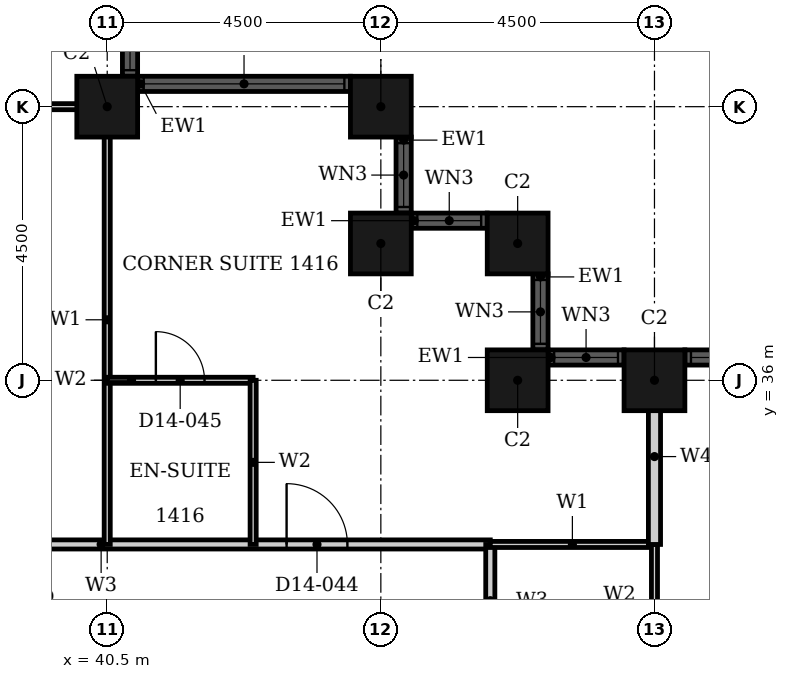
"""IFC4 building model, lengths in metres.
Left out: names, types, materials, properties, quantities, classifications, styles, units other than length and angle.
Written with IfcOpenShell. Run it as: python <this file> out.ifc"""

import sys

from ifc_helpers import new_model, si_unit, direction, frame, frame_2d, origin, origin_2d, place, context, subcontext, project, spatial, rectangle, hollow_rectangle, extrude, element, fill, save


model = new_model("IFC4")
c1 = context("Model", 3, precision=1e-05, world=origin(), true_north=direction((0.0, 1.0)))
c2 = subcontext(c1, "Body", "Model", "MODEL_VIEW")
j1 = project(units=[si_unit("LENGTHUNIT", "METRE"), si_unit("PLANEANGLEUNIT", "RADIAN")], contexts=[c1])
p1 = place(None, origin())
s1 = spatial("IfcSite", under=j1, at=p1, CompositionType="ELEMENT")
p2 = place(p1, origin())
s2 = spatial("IfcBuilding", under=s1, at=p2, CompositionType="ELEMENT")
p3 = place(p2, frame((0.0, 0.0, 63.6)))
s3 = spatial("IfcBuildingStorey", under=s2, at=p3, CompositionType="ELEMENT", Elevation=63.6)
for number, where, z_axis, x_axis in (
    (1, (49.5, 36.0, 0.0), (0.0, 0.0, 1.0), (1.0, 0.0, 0.0)),
    (2, (47.25, 36.0, 0.0), (0.0, 0.0, 1.0), (1.0, 0.0, 0.0)),
    (3, (47.25, 38.25, 0.0), (0.0, 0.0, 1.0), (1.0, 0.0, 0.0)),
    (4, (45.0, 38.25, 0.0), (0.0, 0.0, 1.0), (1.0, 0.0, 0.0)),
    (5, (45.0, 40.5, 0.0), (0.0, 0.0, 1.0), (1.0, 0.0, 0.0)),
    (6, (40.5, 40.5, 0.0), (0.0, 0.0, 1.0), (1.0, 0.0, 0.0)),
):
    element("IfcColumn", number, at=place(p3, frame(where, z_axis=z_axis, x_axis=x_axis)), inside=s3, PredefinedType="COLUMN", context=c2, shape_type="SweptSolid", body=[
        extrude(hollow_rectangle(XDim=1.0, YDim=1.0, WallThickness=0.032, at=origin_2d()), origin(), (0.0, 0.0, 1.0), 3.6),
    ])
p4 = place(p3, frame((58.0, 36.375, 0.0), z_axis=(0.0, 0.0, 1.0), x_axis=(-1.0, 0.0, 0.0)))
e7 = element("IfcWall", 7, at=p4, inside=s3, PredefinedType="SOLIDWALL", context=c2, shape_type="SweptSolid", body=[
    extrude(rectangle(XDim=8.0, YDim=0.25, at=frame_2d((4.0, 0.0))), origin(), (0.0, 0.0, 1.0), 3.6),
])
p5 = place(p4, frame((0.1, 0.0, 0.9)))
e8 = element("IfcOpeningElement", 8, at=p5, cuts=e7, PredefinedType="OPENING", context=c2, shape_type="SweptSolid", body=[
    extrude(rectangle(XDim=3.3, YDim=2.08, at=frame_2d((1.65, 1.04))), frame((0.0, 0.135, 0.0), z_axis=(0.0, -1.0, 0.0), x_axis=(1.0, 0.0, 0.0)), (0.0, 0.0, 1.0), 0.27),
])
p6 = place(p4, frame((4.6, 0.0, 0.9)))
e9 = element("IfcOpeningElement", 9, at=p6, cuts=e7, PredefinedType="OPENING", context=c2, shape_type="SweptSolid", body=[
    extrude(rectangle(XDim=3.3, YDim=2.08, at=frame_2d((1.65, 1.04))), frame((0.0, 0.135, 0.0), z_axis=(0.0, -1.0, 0.0), x_axis=(1.0, 0.0, 0.0)), (0.0, 0.0, 1.0), 0.27),
])
p7 = place(p3, frame((49.0, 36.375, 0.0), z_axis=(0.0, 0.0, 1.0), x_axis=(-1.0, 0.0, 0.0)))
e10 = element("IfcWall", 10, at=p7, inside=s3, PredefinedType="SOLIDWALL", context=c2, shape_type="SweptSolid", body=[
    extrude(rectangle(XDim=1.25, YDim=0.25, at=frame_2d((0.625, 0.0))), origin(), (0.0, 0.0, 1.0), 3.6),
])
p8 = place(p7, frame((0.1, 0.0, 0.9)))
e11 = element("IfcOpeningElement", 11, at=p8, cuts=e10, PredefinedType="OPENING", context=c2, shape_type="SweptSolid", body=[
    extrude(rectangle(XDim=1.05, YDim=2.08, at=frame_2d((0.525, 1.04))), frame((0.0, 0.135, 0.0), z_axis=(0.0, -1.0, 0.0), x_axis=(1.0, 0.0, 0.0)), (0.0, 0.0, 1.0), 0.27),
])
p9 = place(p3, frame((47.625, 36.5, 0.0), z_axis=(0.0, 0.0, 1.0), x_axis=(0.0, 1.0, 0.0)))
e12 = element("IfcWall", 12, at=p9, inside=s3, PredefinedType="SOLIDWALL", context=c2, shape_type="SweptSolid", body=[
    extrude(rectangle(XDim=1.25, YDim=0.25, at=frame_2d((0.625, 0.0))), origin(), (0.0, 0.0, 1.0), 3.6),
])
p10 = place(p9, frame((0.1, 0.0, 0.9)))
e13 = element("IfcOpeningElement", 13, at=p10, cuts=e12, PredefinedType="OPENING", context=c2, shape_type="SweptSolid", body=[
    extrude(rectangle(XDim=1.05, YDim=2.08, at=frame_2d((0.525, 1.04))), frame((0.0, 0.135, 0.0), z_axis=(0.0, -1.0, 0.0), x_axis=(1.0, 0.0, 0.0)), (0.0, 0.0, 1.0), 0.27),
])
p11 = place(p3, frame((46.75, 38.625, 0.0), z_axis=(0.0, 0.0, 1.0), x_axis=(-1.0, 0.0, 0.0)))
e14 = element("IfcWall", 14, at=p11, inside=s3, PredefinedType="SOLIDWALL", context=c2, shape_type="SweptSolid", body=[
    extrude(rectangle(XDim=1.25, YDim=0.25, at=frame_2d((0.625, 0.0))), origin(), (0.0, 0.0, 1.0), 3.6),
])
p12 = place(p11, frame((0.1, 0.0, 0.9)))
e15 = element("IfcOpeningElement", 15, at=p12, cuts=e14, PredefinedType="OPENING", context=c2, shape_type="SweptSolid", body=[
    extrude(rectangle(XDim=1.05, YDim=2.08, at=frame_2d((0.525, 1.04))), frame((0.0, 0.135, 0.0), z_axis=(0.0, -1.0, 0.0), x_axis=(1.0, 0.0, 0.0)), (0.0, 0.0, 1.0), 0.27),
])
p13 = place(p3, frame((45.375, 38.75, 0.0), z_axis=(0.0, 0.0, 1.0), x_axis=(0.0, 1.0, 0.0)))
e16 = element("IfcWall", 16, at=p13, inside=s3, PredefinedType="SOLIDWALL", context=c2, shape_type="SweptSolid", body=[
    extrude(rectangle(XDim=1.25, YDim=0.25, at=frame_2d((0.625, 0.0))), origin(), (0.0, 0.0, 1.0), 3.6),
])
p14 = place(p13, frame((0.1, 0.0, 0.9)))
e17 = element("IfcOpeningElement", 17, at=p14, cuts=e16, PredefinedType="OPENING", context=c2, shape_type="SweptSolid", body=[
    extrude(rectangle(XDim=1.05, YDim=2.08, at=frame_2d((0.525, 1.04))), frame((0.0, 0.135, 0.0), z_axis=(0.0, -1.0, 0.0), x_axis=(1.0, 0.0, 0.0)), (0.0, 0.0, 1.0), 0.27),
])
p15 = place(p3, frame((44.5, 40.875, 0.0), z_axis=(0.0, 0.0, 1.0), x_axis=(-1.0, 0.0, 0.0)))
e18 = element("IfcWall", 18, at=p15, inside=s3, PredefinedType="SOLIDWALL", context=c2, shape_type="SweptSolid", body=[
    extrude(rectangle(XDim=3.5, YDim=0.25, at=frame_2d((1.75, 0.0))), origin(), (0.0, 0.0, 1.0), 3.6),
])
p16 = place(p15, frame((0.1, 0.0, 0.9)))
e19 = element("IfcOpeningElement", 19, at=p16, cuts=e18, PredefinedType="OPENING", context=c2, shape_type="SweptSolid", body=[
    extrude(rectangle(XDim=3.3, YDim=2.08, at=frame_2d((1.65, 1.04))), frame((0.0, 0.135, 0.0), z_axis=(0.0, -1.0, 0.0), x_axis=(1.0, 0.0, 0.0)), (0.0, 0.0, 1.0), 0.27),
])
p17 = place(p3, frame((40.875, 41.0, 0.0), z_axis=(0.0, 0.0, 1.0), x_axis=(0.0, 1.0, 0.0)))
e20 = element("IfcWall", 20, at=p17, inside=s3, PredefinedType="SOLIDWALL", context=c2, shape_type="SweptSolid", body=[
    extrude(rectangle(XDim=8.0, YDim=0.25, at=frame_2d((4.0, 0.0))), origin(), (0.0, 0.0, 1.0), 3.6),
])
p18 = place(p17, frame((0.1, 0.0, 0.9)))
e21 = element("IfcOpeningElement", 21, at=p18, cuts=e20, PredefinedType="OPENING", context=c2, shape_type="SweptSolid", body=[
    extrude(rectangle(XDim=3.3, YDim=2.08, at=frame_2d((1.65, 1.04))), frame((0.0, 0.135, 0.0), z_axis=(0.0, -1.0, 0.0), x_axis=(1.0, 0.0, 0.0)), (0.0, 0.0, 1.0), 0.27),
])
p19 = place(p17, frame((4.6, 0.0, 0.9)))
e22 = element("IfcOpeningElement", 22, at=p19, cuts=e20, PredefinedType="OPENING", context=c2, shape_type="SweptSolid", body=[
    extrude(rectangle(XDim=3.3, YDim=2.08, at=frame_2d((1.65, 1.04))), frame((0.0, 0.135, 0.0), z_axis=(0.0, -1.0, 0.0), x_axis=(1.0, 0.0, 0.0)), (0.0, 0.0, 1.0), 0.27),
])
p20 = place(p3, frame((33.3, 33.3, 0.0), z_axis=(0.0, 0.0, 1.0), x_axis=(1.0, 0.0, 0.0)))
e23 = element("IfcWall", 23, at=p20, inside=s3, PredefinedType="PARTITIONING", context=c2, shape_type="SweptSolid", body=[
    extrude(rectangle(XDim=13.5, YDim=0.15, at=frame_2d((6.75, 0.0))), origin(), (0.0, 0.0, 1.0), 3.3),
])
p21 = place(p20, frame((10.15, 0.0, 0.0)))
e24 = element("IfcOpeningElement", 24, at=p21, cuts=e23, PredefinedType="OPENING", context=c2, shape_type="SweptSolid", body=[
    extrude(rectangle(XDim=1.0, YDim=2.1, at=frame_2d((0.5, 1.05))), frame((0.0, 0.085, 0.0), z_axis=(0.0, -1.0, 0.0), x_axis=(1.0, 0.0, 0.0)), (0.0, 0.0, 1.0), 0.17),
])
p22 = place(p20, frame((3.15, 0.0, 0.0)))
e25 = element("IfcOpeningElement", 25, at=p22, cuts=e23, PredefinedType="OPENING", context=c2, shape_type="SweptSolid", body=[
    extrude(rectangle(XDim=0.9, YDim=2.1, at=frame_2d((0.45, 1.05))), frame((0.0, 0.085, 0.0), z_axis=(0.0, -1.0, 0.0), x_axis=(1.0, 0.0, 0.0)), (0.0, 0.0, 1.0), 0.17),
])
p23 = place(p3, frame((46.8, 28.8, 0.0), z_axis=(0.0, 0.0, 1.0), x_axis=(0.0, 1.0, 0.0)))
e26 = element("IfcWall", 26, at=p23, inside=s3, PredefinedType="PARTITIONING", context=c2, shape_type="SweptSolid", body=[
    extrude(rectangle(XDim=4.5, YDim=0.15, at=frame_2d((2.25, 0.0))), origin(), (0.0, 0.0, 1.0), 3.3),
])
p24 = place(p23, frame((1.75, 0.0, 0.0)))
e27 = element("IfcOpeningElement", 27, at=p24, cuts=e26, PredefinedType="OPENING", context=c2, shape_type="SweptSolid", body=[
    extrude(rectangle(XDim=0.9, YDim=2.1, at=frame_2d((0.45, 1.05))), frame((0.0, 0.085, 0.0), z_axis=(0.0, -1.0, 0.0), x_axis=(1.0, 0.0, 0.0)), (0.0, 0.0, 1.0), 0.17),
])
p25 = place(p3, frame((46.8, 33.3, 0.0), z_axis=(0.0, 0.0, 1.0), x_axis=(1.0, 0.0, 0.0)))
e28 = element("IfcWall", 28, at=p25, inside=s3, PredefinedType="PARTITIONING", context=c2, shape_type="SweptSolid", body=[
    extrude(rectangle(XDim=2.7, YDim=0.1, at=frame_2d((1.35, 0.0))), origin(), (0.0, 0.0, 1.0), 3.3),
])
p26 = place(p3, frame((33.3, 40.5, 0.0), z_axis=(0.0, 0.0, 1.0), x_axis=(1.0, 0.0, 0.0)))
e29 = element("IfcWall", 29, at=p26, inside=s3, PredefinedType="PARTITIONING", context=c2, shape_type="SweptSolid", body=[
    extrude(rectangle(XDim=7.39, YDim=0.1, at=frame_2d((3.695, 0.0))), origin(), (0.0, 0.0, 1.0), 2.38),
])
p27 = place(p3, frame((40.5, 33.3, 0.0), z_axis=(0.0, 0.0, 1.0), x_axis=(0.0, 1.0, 0.0)))
e30 = element("IfcWall", 30, at=p27, inside=s3, PredefinedType="PARTITIONING", context=c2, shape_type="SweptSolid", body=[
    extrude(rectangle(XDim=7.39, YDim=0.1, at=frame_2d((3.695, 0.0))), origin(), (0.0, 0.0, 1.0), 3.3),
])
p28 = place(p3, frame((49.5, 28.8, 0.0), z_axis=(0.0, 0.0, 1.0), x_axis=(0.0, 1.0, 0.0)))
e31 = element("IfcWall", 31, at=p28, inside=s3, PredefinedType="PARTITIONING", context=c2, shape_type="SweptSolid", body=[
    extrude(rectangle(XDim=4.5, YDim=0.1, at=frame_2d((2.25, 0.0))), origin(), (0.0, 0.0, 1.0), 2.38),
])
p29 = place(p3, frame((49.5, 33.3, 0.0), z_axis=(0.0, 0.0, 1.0), x_axis=(0.0, 1.0, 0.0)))
e32 = element("IfcWall", 32, at=p29, inside=s3, PredefinedType="PARTITIONING", context=c2, shape_type="SweptSolid", body=[
    extrude(rectangle(XDim=2.89, YDim=0.2, at=frame_2d((1.445, 0.0))), origin(), (0.0, 0.0, 1.0), 2.38),
])
p30 = place(p3, frame((40.5, 36.0, 0.0), z_axis=(0.0, 0.0, 1.0), x_axis=(1.0, 0.0, 0.0)))
e33 = element("IfcWall", 33, at=p30, inside=s3, PredefinedType="PARTITIONING", context=c2, shape_type="SweptSolid", body=[
    extrude(rectangle(XDim=2.4, YDim=0.1, at=frame_2d((1.2, 0.0))), origin(), (0.0, 0.0, 1.0), 3.3),
])
p31 = place(p30, frame((0.8, 0.0, 0.0)))
e34 = element("IfcOpeningElement", 34, at=p31, cuts=e33, PredefinedType="OPENING", context=c2, shape_type="SweptSolid", body=[
    extrude(rectangle(XDim=0.8, YDim=2.1, at=frame_2d((0.4, 1.05))), frame((0.0, 0.06, 0.0), z_axis=(0.0, -1.0, 0.0), x_axis=(1.0, 0.0, 0.0)), (0.0, 0.0, 1.0), 0.12),
])
p32 = place(p3, frame((42.9, 33.3, 0.0), z_axis=(0.0, 0.0, 1.0), x_axis=(0.0, 1.0, 0.0)))
e35 = element("IfcWall", 35, at=p32, inside=s3, PredefinedType="PARTITIONING", context=c2, shape_type="SweptSolid", body=[
    extrude(rectangle(XDim=2.7, YDim=0.1, at=frame_2d((1.35, 0.0))), origin(), (0.0, 0.0, 1.0), 3.3),
])
p33 = place(p6, origin())
e36 = element("IfcWindow", 36, at=p33, inside=s3, PartitioningType="SINGLE_PANEL", PredefinedType="WINDOW", context=c2, shape_type="SweptSolid", body=[
    extrude(rectangle(XDim=3.3, YDim=2.08, at=frame_2d((1.65, 1.04))), frame((0.0, 0.03, 0.0), z_axis=(0.0, -1.0, 0.0), x_axis=(1.0, 0.0, 0.0)), (0.0, 0.0, 1.0), 0.06),
])
fill(e9, e36)
p34 = place(p8, origin())
e37 = element("IfcWindow", 37, at=p34, inside=s3, PartitioningType="SINGLE_PANEL", PredefinedType="WINDOW", context=c2, shape_type="SweptSolid", body=[
    extrude(rectangle(XDim=1.05, YDim=2.08, at=frame_2d((0.525, 1.04))), frame((0.0, 0.03, 0.0), z_axis=(0.0, -1.0, 0.0), x_axis=(1.0, 0.0, 0.0)), (0.0, 0.0, 1.0), 0.06),
])
fill(e11, e37)
p35 = place(p10, origin())
e38 = element("IfcWindow", 38, at=p35, inside=s3, PartitioningType="SINGLE_PANEL", PredefinedType="WINDOW", context=c2, shape_type="SweptSolid", body=[
    extrude(rectangle(XDim=1.05, YDim=2.08, at=frame_2d((0.525, 1.04))), frame((0.0, 0.03, 0.0), z_axis=(0.0, -1.0, 0.0), x_axis=(1.0, 0.0, 0.0)), (0.0, 0.0, 1.0), 0.06),
])
fill(e13, e38)
p36 = place(p12, origin())
e39 = element("IfcWindow", 39, at=p36, inside=s3, PartitioningType="SINGLE_PANEL", PredefinedType="WINDOW", context=c2, shape_type="SweptSolid", body=[
    extrude(rectangle(XDim=1.05, YDim=2.08, at=frame_2d((0.525, 1.04))), frame((0.0, 0.03, 0.0), z_axis=(0.0, -1.0, 0.0), x_axis=(1.0, 0.0, 0.0)), (0.0, 0.0, 1.0), 0.06),
])
fill(e15, e39)
p37 = place(p14, origin())
e40 = element("IfcWindow", 40, at=p37, inside=s3, PartitioningType="SINGLE_PANEL", PredefinedType="WINDOW", context=c2, shape_type="SweptSolid", body=[
    extrude(rectangle(XDim=1.05, YDim=2.08, at=frame_2d((0.525, 1.04))), frame((0.0, 0.03, 0.0), z_axis=(0.0, -1.0, 0.0), x_axis=(1.0, 0.0, 0.0)), (0.0, 0.0, 1.0), 0.06),
])
fill(e17, e40)
p38 = place(p16, origin())
e41 = element("IfcWindow", 41, at=p38, inside=s3, PartitioningType="SINGLE_PANEL", PredefinedType="WINDOW", context=c2, shape_type="SweptSolid", body=[
    extrude(rectangle(XDim=3.3, YDim=2.08, at=frame_2d((1.65, 1.04))), frame((0.0, 0.03, 0.0), z_axis=(0.0, -1.0, 0.0), x_axis=(1.0, 0.0, 0.0)), (0.0, 0.0, 1.0), 0.06),
])
fill(e19, e41)
p39 = place(p18, origin())
e42 = element("IfcWindow", 42, at=p39, inside=s3, PartitioningType="SINGLE_PANEL", PredefinedType="WINDOW", context=c2, shape_type="SweptSolid", body=[
    extrude(rectangle(XDim=3.3, YDim=2.08, at=frame_2d((1.65, 1.04))), frame((0.0, 0.03, 0.0), z_axis=(0.0, -1.0, 0.0), x_axis=(1.0, 0.0, 0.0)), (0.0, 0.0, 1.0), 0.06),
])
fill(e21, e42)
p40 = place(p21, origin())
e43 = element("IfcDoor", 43, at=p40, inside=s3, OperationType="SINGLE_SWING_RIGHT", PredefinedType="DOOR", context=c2, shape_type="SweptSolid", body=[
    extrude(rectangle(XDim=1.0, YDim=2.1, at=frame_2d((0.5, 1.05))), frame((0.0, 0.025, 0.0), z_axis=(0.0, -1.0, 0.0), x_axis=(1.0, 0.0, 0.0)), (0.0, 0.0, 1.0), 0.05),
])
fill(e24, e43)
p41 = place(p31, origin())
e44 = element("IfcDoor", 44, at=p41, inside=s3, OperationType="SINGLE_SWING_LEFT", PredefinedType="DOOR", context=c2, shape_type="SweptSolid", body=[
    extrude(rectangle(XDim=0.8, YDim=2.1, at=frame_2d((0.4, 1.05))), frame((0.0, 0.025, 0.0), z_axis=(0.0, -1.0, 0.0), x_axis=(1.0, 0.0, 0.0)), (0.0, 0.0, 1.0), 0.05),
])
fill(e34, e44)
save(model, sys.argv[1])
